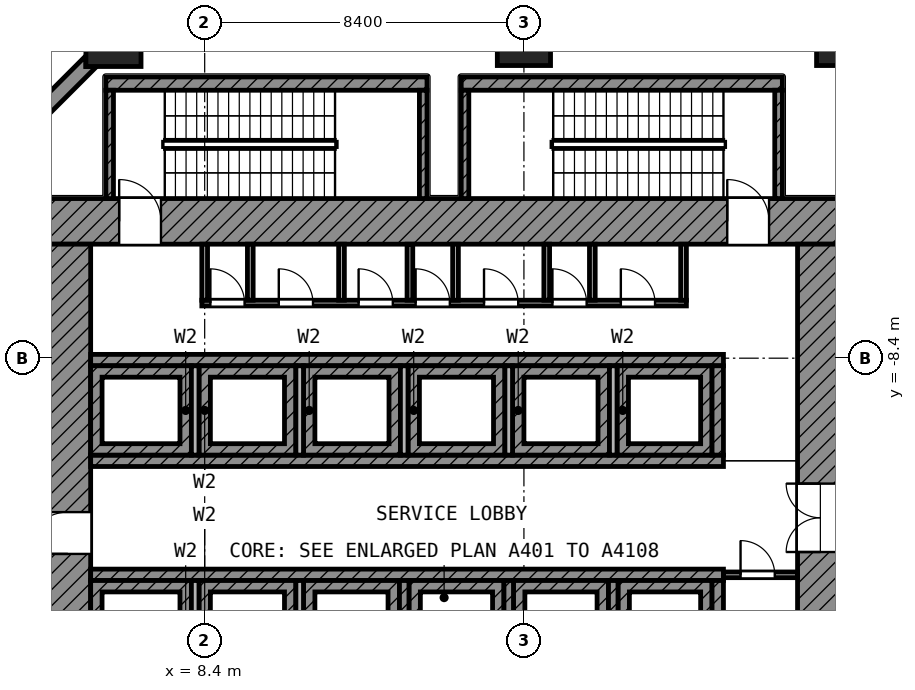
"""IFC4 building model, lengths in metres.
Left out: names, types, materials, properties, quantities, classifications, styles, units other than length and angle.
Written with IfcOpenShell. Run it as: python <this file> out.ifc"""

import sys

from ifc_helpers import new_model, si_unit, direction, frame, frame_2d, origin, origin_2d, place, context, subcontext, project, spatial, polyline, rectangle, outline, extrude, element, fill, save


model = new_model("IFC4")
c1 = context("Model", 3, precision=1e-05, world=origin(), true_north=direction((0.0, 1.0)))
c2 = subcontext(c1, "Body", "Model", "MODEL_VIEW")
j1 = project(units=[si_unit("LENGTHUNIT", "METRE"), si_unit("PLANEANGLEUNIT", "RADIAN")], contexts=[c1])
p1 = place(None, origin())
s1 = spatial("IfcSite", under=j1, at=p1, CompositionType="ELEMENT")
p2 = place(p1, origin())
s2 = spatial("IfcBuilding", under=s1, at=p2, CompositionType="ELEMENT")
p3 = place(p2, frame((0.0, 0.0, -6.0)))
s3 = spatial("IfcBuildingStorey", under=s2, at=p3, CompositionType="ELEMENT", Elevation=-6.0)
p4 = place(p3, origin())
e1 = element("IfcWall", 1, at=p4, inside=s3, PredefinedType="SOLIDWALL", context=c2, shape_type="SweptSolid", body=[
    extrude(outline(polyline([(5.275, -0.725), (5.558, -0.725), (0.725, -5.558), (0.725, -5.275), (0.442, -5.275), (5.275, -0.442), (5.275, -0.725)])), origin(), (0.0, 0.0, 1.0), 5.55),
])
e2 = element("IfcWall", 2, at=p4, inside=s3, PredefinedType="SHEAR", context=c2, shape_type="SweptSolid", body=[
    extrude(outline(polyline([(11.0, -16.6), (11.0, -14.25), (13.525, -14.25), (13.525, -16.6), (11.0, -16.6)]), holes=[polyline([(13.225, -14.55), (11.3, -14.55), (11.3, -16.3), (13.225, -16.3), (13.225, -14.55)])]), origin(), (0.0, 0.0, 1.0), 4.2),
])
e3 = element("IfcWall", 3, at=p4, inside=s3, PredefinedType="SHEAR", context=c2, shape_type="SweptSolid", body=[
    extrude(outline(polyline([(13.775, -16.6), (13.775, -14.25), (16.275, -14.25), (16.275, -16.6), (13.775, -16.6)]), holes=[polyline([(15.975, -14.55), (14.075, -14.55), (14.075, -16.3), (15.975, -16.3), (15.975, -14.55)])]), origin(), (0.0, 0.0, 1.0), 4.2),
])
e4 = element("IfcWall", 4, at=p4, inside=s3, PredefinedType="SHEAR", context=c2, shape_type="SweptSolid", body=[
    extrude(outline(polyline([(16.525, -16.6), (16.525, -14.25), (19.025, -14.25), (19.025, -16.6), (16.525, -16.6)]), holes=[polyline([(18.725, -14.55), (16.825, -14.55), (16.825, -16.3), (18.725, -16.3), (18.725, -14.55)])]), origin(), (0.0, 0.0, 1.0), 4.2),
])
e5 = element("IfcWall", 5, at=p4, inside=s3, PredefinedType="SHEAR", context=c2, shape_type="SweptSolid", body=[
    extrude(outline(polyline([(19.275, -16.6), (19.275, -14.25), (21.75, -14.25), (21.75, -16.6), (19.275, -16.6)]), holes=[polyline([(21.45, -14.55), (19.575, -14.55), (19.575, -16.3), (21.45, -16.3), (21.45, -14.55)])]), origin(), (0.0, 0.0, 1.0), 4.2),
])
e6 = element("IfcWall", 6, at=p4, inside=s3, PredefinedType="SHEAR", context=c2, shape_type="SweptSolid", body=[
    extrude(outline(polyline([(5.4, -10.95), (5.4, -8.6), (8.05, -8.6), (8.05, -10.95), (5.4, -10.95)]), holes=[polyline([(7.75, -8.9), (5.7, -8.9), (5.7, -10.65), (7.75, -10.65), (7.75, -8.9)])]), origin(), (0.0, 0.0, 1.0), 4.2),
])
e7 = element("IfcWall", 7, at=p4, inside=s3, PredefinedType="SHEAR", context=c2, shape_type="SweptSolid", body=[
    extrude(outline(polyline([(8.25, -10.95), (8.25, -8.6), (10.8, -8.6), (10.8, -10.95), (8.25, -10.95)]), holes=[polyline([(10.5, -8.9), (8.55, -8.9), (8.55, -10.65), (10.5, -10.65), (10.5, -8.9)])]), origin(), (0.0, 0.0, 1.0), 4.2),
])
e8 = element("IfcWall", 8, at=p4, inside=s3, PredefinedType="SHEAR", context=c2, shape_type="SweptSolid", body=[
    extrude(outline(polyline([(11.0, -10.95), (11.0, -8.6), (13.55, -8.6), (13.55, -10.95), (11.0, -10.95)]), holes=[polyline([(13.25, -8.9), (11.3, -8.9), (11.3, -10.65), (13.25, -10.65), (13.25, -8.9)])]), origin(), (0.0, 0.0, 1.0), 4.2),
])
e9 = element("IfcWall", 9, at=p4, inside=s3, PredefinedType="SHEAR", context=c2, shape_type="SweptSolid", body=[
    extrude(outline(polyline([(13.75, -10.95), (13.75, -8.6), (16.3, -8.6), (16.3, -10.95), (13.75, -10.95)]), holes=[polyline([(16.0, -8.9), (14.05, -8.9), (14.05, -10.65), (16.0, -10.65), (16.0, -8.9)])]), origin(), (0.0, 0.0, 1.0), 4.2),
])
e10 = element("IfcWall", 10, at=p4, inside=s3, PredefinedType="SHEAR", context=c2, shape_type="SweptSolid", body=[
    extrude(outline(polyline([(16.5, -10.95), (16.5, -8.6), (19.05, -8.6), (19.05, -10.95), (16.5, -10.95)]), holes=[polyline([(18.75, -8.9), (16.8, -8.9), (16.8, -10.65), (18.75, -10.65), (18.75, -8.9)])]), origin(), (0.0, 0.0, 1.0), 4.2),
])
e11 = element("IfcWall", 11, at=p4, inside=s3, PredefinedType="SHEAR", context=c2, shape_type="SweptSolid", body=[
    extrude(outline(polyline([(19.25, -10.95), (19.25, -8.6), (21.75, -8.6), (21.75, -10.95), (19.25, -10.95)]), holes=[polyline([(21.45, -8.9), (19.55, -8.9), (19.55, -10.65), (21.45, -10.65), (21.45, -8.9)])]), origin(), (0.0, 0.0, 1.0), 4.2),
])
e12 = element("IfcWall", 12, at=p4, inside=s3, PredefinedType="SHEAR", context=c2, shape_type="SweptSolid", body=[
    extrude(outline(polyline([(5.4, -16.6), (5.4, -14.25), (8.05, -14.25), (8.05, -16.6), (5.4, -16.6)]), holes=[polyline([(7.75, -14.55), (5.7, -14.55), (5.7, -16.3), (7.75, -16.3), (7.75, -14.55)])]), origin(), (0.0, 0.0, 1.0), 4.2),
])
e13 = element("IfcWall", 13, at=p4, inside=s3, PredefinedType="SHEAR", context=c2, shape_type="SweptSolid", body=[
    extrude(outline(polyline([(8.25, -16.6), (8.25, -14.25), (10.8, -14.25), (10.8, -16.6), (8.25, -16.6)]), holes=[polyline([(10.5, -14.55), (8.55, -14.55), (8.55, -16.3), (10.5, -16.3), (10.5, -14.55)])]), origin(), (0.0, 0.0, 1.0), 4.2),
])
p5 = place(p3, frame((6.0, 0.0, 0.0), z_axis=(0.0, 0.0, 1.0), x_axis=(1.0, 0.0, 0.0)))
e14 = element("IfcColumn", 14, at=p5, inside=s3, PredefinedType="COLUMN", context=c2, shape_type="SweptSolid", body=[
    extrude(rectangle(XDim=1.45, YDim=1.45, at=origin_2d()), origin(), (0.0, 0.0, 1.0), 6.0),
])
for number, where, z_axis, x_axis in (
    (15, (16.8, 0.0, 0.0), (0.0, 0.0, 1.0), (1.0, 0.0, 0.0)),
    (16, (25.2, 0.0, 0.0), (0.0, 0.0, 1.0), (1.0, 0.0, 0.0)),
):
    element("IfcColumn", number, at=place(p3, frame(where, z_axis=z_axis, x_axis=x_axis)), inside=s3, PredefinedType="COLUMN", context=c2, shape_type="SweptSolid", body=[
        extrude(rectangle(XDim=1.4, YDim=1.4, at=origin_2d()), origin(), (0.0, 0.0, 1.0), 6.0),
    ])
p6 = place(p3, frame((4.2, -4.8, 0.0), z_axis=(0.0, 0.0, 1.0), x_axis=(1.0, 0.0, 0.0)))
e17 = element("IfcWall", 17, at=p6, inside=s3, PredefinedType="SHEAR", context=c2, shape_type="SweptSolid", body=[
    extrude(rectangle(XDim=21.0, YDim=1.2, at=frame_2d((10.5, 0.0))), origin(), (0.0, 0.0, 1.0), 5.55),
])
p7 = place(p6, frame((1.95, 0.0, 0.0)))
e18 = element("IfcOpeningElement", 18, at=p7, cuts=e17, PredefinedType="OPENING", context=c2, shape_type="SweptSolid", body=[
    extrude(rectangle(XDim=1.1, YDim=2.1, at=frame_2d((0.55, 1.05))), frame((0.0, 0.61, 0.0), z_axis=(0.0, -1.0, 0.0), x_axis=(1.0, 0.0, 0.0)), (0.0, 0.0, 1.0), 1.22),
])
p8 = place(p6, frame((17.95, 0.0, 0.0)))
e19 = element("IfcOpeningElement", 19, at=p8, cuts=e17, PredefinedType="OPENING", context=c2, shape_type="SweptSolid", body=[
    extrude(rectangle(XDim=1.1, YDim=2.1, at=frame_2d((0.55, 1.05))), frame((0.0, 0.61, 0.0), z_axis=(0.0, -1.0, 0.0), x_axis=(1.0, 0.0, 0.0)), (0.0, 0.0, 1.0), 1.22),
])
p9 = place(p3, frame((4.8, -25.2, 0.0), z_axis=(0.0, 0.0, 1.0), x_axis=(0.0, 1.0, 0.0)))
e20 = element("IfcWall", 20, at=p9, inside=s3, PredefinedType="SHEAR", context=c2, shape_type="SweptSolid", body=[
    extrude(rectangle(XDim=19.8, YDim=1.2, at=frame_2d((9.9, 0.0))), origin(), (0.0, 0.0, 1.0), 5.55),
])
p10 = place(p9, frame((11.65, 0.0, 0.0)))
e21 = element("IfcOpeningElement", 21, at=p10, cuts=e20, PredefinedType="OPENING", context=c2, shape_type="SweptSolid", body=[
    extrude(rectangle(XDim=1.1, YDim=2.1, at=frame_2d((0.55, 1.05))), frame((0.0, 0.61, 0.0), z_axis=(0.0, -1.0, 0.0), x_axis=(1.0, 0.0, 0.0)), (0.0, 0.0, 1.0), 1.22),
])
p11 = place(p9, frame((2.35, 0.0, 0.0)))
e22 = element("IfcOpeningElement", 22, at=p11, cuts=e20, PredefinedType="OPENING", context=c2, shape_type="SweptSolid", body=[
    extrude(rectangle(XDim=1.1, YDim=2.1, at=frame_2d((0.55, 1.05))), frame((0.0, 0.61, 0.0), z_axis=(0.0, -1.0, 0.0), x_axis=(1.0, 0.0, 0.0)), (0.0, 0.0, 1.0), 1.22),
])
p12 = place(p3, frame((24.6, -24.0, 0.0), z_axis=(0.0, 0.0, 1.0), x_axis=(0.0, 1.0, 0.0)))
e23 = element("IfcWall", 23, at=p12, inside=s3, PredefinedType="SHEAR", context=c2, shape_type="SweptSolid", body=[
    extrude(rectangle(XDim=18.6, YDim=1.2, at=frame_2d((9.3, 0.0))), origin(), (0.0, 0.0, 1.0), 5.55),
])
p13 = place(p12, frame((10.5, 0.0, 0.0)))
e24 = element("IfcOpeningElement", 24, at=p13, cuts=e23, PredefinedType="OPENING", context=c2, shape_type="SweptSolid", body=[
    extrude(rectangle(XDim=1.8, YDim=2.1, at=frame_2d((0.9, 1.05))), frame((0.0, 0.61, 0.0), z_axis=(0.0, -1.0, 0.0), x_axis=(1.0, 0.0, 0.0)), (0.0, 0.0, 1.0), 1.22),
])
for number, where, z_axis, x_axis in (
    (25, (5.4, -8.45, 0.0), (0.0, 0.0, 1.0), (1.0, 0.0, 0.0)),
    (26, (5.4, -11.1, 0.0), (0.0, 0.0, 1.0), (1.0, 0.0, 0.0)),
    (27, (5.4, -14.1, 0.0), (0.0, 0.0, 1.0), (1.0, 0.0, 0.0)),
):
    element("IfcWall", number, at=place(p3, frame(where, z_axis=z_axis, x_axis=x_axis)), inside=s3, PredefinedType="SHEAR", context=c2, shape_type="SweptSolid", body=[
        extrude(rectangle(XDim=16.65, YDim=0.3, at=frame_2d((8.325, 0.0))), origin(), (0.0, 0.0, 1.0), 5.55),
    ])
p14 = place(p3, frame((21.9, -10.95, 0.0), z_axis=(0.0, 0.0, 1.0), x_axis=(0.0, 1.0, 0.0)))
e28 = element("IfcWall", 28, at=p14, inside=s3, PredefinedType="SHEAR", context=c2, shape_type="SweptSolid", body=[
    extrude(rectangle(XDim=2.35, YDim=0.3, at=frame_2d((1.175, 0.0))), origin(), (0.0, 0.0, 1.0), 5.55),
])
p15 = place(p3, frame((21.9, -16.6, 0.0), z_axis=(0.0, 0.0, 1.0), x_axis=(0.0, 1.0, 0.0)))
e29 = element("IfcWall", 29, at=p15, inside=s3, PredefinedType="SHEAR", context=c2, shape_type="SweptSolid", body=[
    extrude(rectangle(XDim=2.35, YDim=0.3, at=frame_2d((1.175, 0.0))), origin(), (0.0, 0.0, 1.0), 5.55),
])
for number, where, z_axis, x_axis in (
    (30, (8.15, -10.95, 0.0), (0.0, 0.0, 1.0), (0.0, 1.0, 0.0)),
    (31, (10.9, -10.95, 0.0), (0.0, 0.0, 1.0), (0.0, 1.0, 0.0)),
    (32, (13.65, -10.95, 0.0), (0.0, 0.0, 1.0), (0.0, 1.0, 0.0)),
    (33, (16.4, -10.95, 0.0), (0.0, 0.0, 1.0), (0.0, 1.0, 0.0)),
    (34, (19.15, -10.95, 0.0), (0.0, 0.0, 1.0), (0.0, 1.0, 0.0)),
):
    element("IfcWall", number, at=place(p3, frame(where, z_axis=z_axis, x_axis=x_axis)), inside=s3, PredefinedType="PARTITIONING", context=c2, shape_type="SweptSolid", body=[
        extrude(rectangle(XDim=2.35, YDim=0.2, at=frame_2d((1.175, 0.0))), origin(), (0.0, 0.0, 1.0), 5.55),
    ])
for number, where, z_axis, x_axis in (
    (35, (8.15, -16.6, 0.0), (0.0, 0.0, 1.0), (0.0, 1.0, 0.0)),
    (36, (10.9, -16.6, 0.0), (0.0, 0.0, 1.0), (0.0, 1.0, 0.0)),
):
    element("IfcWall", number, at=place(p3, frame(where, z_axis=z_axis, x_axis=x_axis)), inside=s3, PredefinedType="PARTITIONING", context=c2, shape_type="SweptSolid", body=[
        extrude(rectangle(XDim=2.35, YDim=0.2, at=frame_2d((1.175, 0.0))), origin(), (0.0, 0.0, 1.0), 5.55),
    ])
for number, where, z_axis, x_axis in (
    (37, (13.65, -16.6, 0.0), (0.0, 0.0, 1.0), (0.0, 1.0, 0.0)),
    (38, (16.4, -16.6, 0.0), (0.0, 0.0, 1.0), (0.0, 1.0, 0.0)),
    (39, (19.15, -16.6, 0.0), (0.0, 0.0, 1.0), (0.0, 1.0, 0.0)),
):
    element("IfcWall", number, at=place(p3, frame(where, z_axis=z_axis, x_axis=x_axis)), inside=s3, PredefinedType="SHEAR", context=c2, shape_type="SweptSolid", body=[
        extrude(rectangle(XDim=2.35, YDim=0.25, at=frame_2d((1.175, 0.0))), origin(), (0.0, 0.0, 1.0), 5.55),
    ])
p16 = place(p3, frame((22.05, -14.1, 0.0), z_axis=(0.0, 0.0, 1.0), x_axis=(1.0, 0.0, 0.0)))
e40 = element("IfcWall", 40, at=p16, inside=s3, PredefinedType="PARTITIONING", context=c2, shape_type="SweptSolid", body=[
    extrude(rectangle(XDim=1.95, YDim=0.15, at=frame_2d((0.975, 0.0))), origin(), (0.0, 0.0, 1.0), 5.55),
])
p17 = place(p16, frame((0.45, 0.0, 0.0)))
e41 = element("IfcOpeningElement", 41, at=p17, cuts=e40, PredefinedType="OPENING", context=c2, shape_type="SweptSolid", body=[
    extrude(rectangle(XDim=0.9, YDim=2.1, at=frame_2d((0.45, 1.05))), frame((0.0, 0.085, 0.0), z_axis=(0.0, -1.0, 0.0), x_axis=(1.0, 0.0, 0.0)), (0.0, 0.0, 1.0), 0.17),
])
p18 = place(p3, frame((8.325, -6.95, 0.0), z_axis=(0.0, 0.0, 1.0), x_axis=(1.0, 0.0, 0.0)))
e42 = element("IfcWall", 42, at=p18, inside=s3, PredefinedType="PARTITIONING", context=c2, shape_type="SweptSolid", body=[
    extrude(rectangle(XDim=12.75, YDim=0.15, at=frame_2d((6.375, 0.0))), origin(), (0.0, 0.0, 1.0), 5.55),
])
p19 = place(p18, frame((0.225, 0.0, 0.0)))
e43 = element("IfcOpeningElement", 43, at=p19, cuts=e42, PredefinedType="OPENING", context=c2, shape_type="SweptSolid", body=[
    extrude(rectangle(XDim=0.9, YDim=2.1, at=frame_2d((0.45, 1.05))), frame((0.0, 0.085, 0.0), z_axis=(0.0, -1.0, 0.0), x_axis=(1.0, 0.0, 0.0)), (0.0, 0.0, 1.0), 0.17),
])
p20 = place(p18, frame((2.025, 0.0, 0.0)))
e44 = element("IfcOpeningElement", 44, at=p20, cuts=e42, PredefinedType="OPENING", context=c2, shape_type="SweptSolid", body=[
    extrude(rectangle(XDim=0.9, YDim=2.1, at=frame_2d((0.45, 1.05))), frame((0.0, 0.085, 0.0), z_axis=(0.0, -1.0, 0.0), x_axis=(1.0, 0.0, 0.0)), (0.0, 0.0, 1.0), 0.17),
])
p21 = place(p18, frame((4.125, 0.0, 0.0)))
e45 = element("IfcOpeningElement", 45, at=p21, cuts=e42, PredefinedType="OPENING", context=c2, shape_type="SweptSolid", body=[
    extrude(rectangle(XDim=0.9, YDim=2.1, at=frame_2d((0.45, 1.05))), frame((0.0, 0.085, 0.0), z_axis=(0.0, -1.0, 0.0), x_axis=(1.0, 0.0, 0.0)), (0.0, 0.0, 1.0), 0.17),
])
p22 = place(p18, frame((5.625, 0.0, 0.0)))
e46 = element("IfcOpeningElement", 46, at=p22, cuts=e42, PredefinedType="OPENING", context=c2, shape_type="SweptSolid", body=[
    extrude(rectangle(XDim=0.9, YDim=2.1, at=frame_2d((0.45, 1.05))), frame((0.0, 0.085, 0.0), z_axis=(0.0, -1.0, 0.0), x_axis=(1.0, 0.0, 0.0)), (0.0, 0.0, 1.0), 0.17),
])
p23 = place(p18, frame((7.425, 0.0, 0.0)))
e47 = element("IfcOpeningElement", 47, at=p23, cuts=e42, PredefinedType="OPENING", context=c2, shape_type="SweptSolid", body=[
    extrude(rectangle(XDim=0.9, YDim=2.1, at=frame_2d((0.45, 1.05))), frame((0.0, 0.085, 0.0), z_axis=(0.0, -1.0, 0.0), x_axis=(1.0, 0.0, 0.0)), (0.0, 0.0, 1.0), 0.17),
])
p24 = place(p18, frame((9.225, 0.0, 0.0)))
e48 = element("IfcOpeningElement", 48, at=p24, cuts=e42, PredefinedType="OPENING", context=c2, shape_type="SweptSolid", body=[
    extrude(rectangle(XDim=0.9, YDim=2.1, at=frame_2d((0.45, 1.05))), frame((0.0, 0.085, 0.0), z_axis=(0.0, -1.0, 0.0), x_axis=(1.0, 0.0, 0.0)), (0.0, 0.0, 1.0), 0.17),
])
p25 = place(p18, frame((11.025, 0.0, 0.0)))
e49 = element("IfcOpeningElement", 49, at=p25, cuts=e42, PredefinedType="OPENING", context=c2, shape_type="SweptSolid", body=[
    extrude(rectangle(XDim=0.9, YDim=2.1, at=frame_2d((0.45, 1.05))), frame((0.0, 0.085, 0.0), z_axis=(0.0, -1.0, 0.0), x_axis=(1.0, 0.0, 0.0)), (0.0, 0.0, 1.0), 0.17),
])
for number, where, z_axis, x_axis in (
    (50, (8.4, -6.875, 0.0), (0.0, 0.0, 1.0), (0.0, 1.0, 0.0)),
    (51, (9.6, -6.875, 0.0), (0.0, 0.0, 1.0), (0.0, 1.0, 0.0)),
    (52, (12.0, -6.875, 0.0), (0.0, 0.0, 1.0), (0.0, 1.0, 0.0)),
    (53, (13.8, -6.875, 0.0), (0.0, 0.0, 1.0), (0.0, 1.0, 0.0)),
    (54, (15.0, -6.875, 0.0), (0.0, 0.0, 1.0), (0.0, 1.0, 0.0)),
    (55, (17.4, -6.875, 0.0), (0.0, 0.0, 1.0), (0.0, 1.0, 0.0)),
    (56, (18.6, -6.875, 0.0), (0.0, 0.0, 1.0), (0.0, 1.0, 0.0)),
    (57, (21.0, -6.875, 0.0), (0.0, 0.0, 1.0), (0.0, 1.0, 0.0)),
):
    element("IfcWall", number, at=place(p3, frame(where, z_axis=z_axis, x_axis=x_axis)), inside=s3, PredefinedType="PARTITIONING", context=c2, shape_type="SweptSolid", body=[
        extrude(rectangle(XDim=1.475, YDim=0.15, at=frame_2d((0.738, 0.0))), origin(), (0.0, 0.0, 1.0), 5.55),
    ])
p26 = place(p3, frame((5.8, -1.175, 0.0), z_axis=(0.0, 0.0, 1.0), x_axis=(1.0, 0.0, 0.0)))
e58 = element("IfcWall", 58, at=p26, inside=s3, PredefinedType="SHEAR", context=c2, shape_type="SweptSolid", body=[
    extrude(rectangle(XDim=8.45, YDim=0.35, at=frame_2d((4.225, 0.0))), origin(), (0.0, 0.0, 1.0), 5.55),
])
for number, where, z_axis, x_axis in (
    (59, (5.9, -4.2, 0.0), (0.0, 0.0, 1.0), (0.0, 1.0, 0.0)),
    (60, (14.15, -4.2, 0.0), (0.0, 0.0, 1.0), (0.0, 1.0, 0.0)),
):
    element("IfcWall", number, at=place(p3, frame(where, z_axis=z_axis, x_axis=x_axis)), inside=s3, PredefinedType="SHEAR", context=c2, shape_type="SweptSolid", body=[
        extrude(rectangle(XDim=2.85, YDim=0.2, at=frame_2d((1.425, 0.0))), origin(), (0.0, 0.0, 1.0), 5.55),
    ])
p27 = place(p3, frame((15.15, -1.175, 0.0), z_axis=(0.0, 0.0, 1.0), x_axis=(1.0, 0.0, 0.0)))
e61 = element("IfcWall", 61, at=p27, inside=s3, PredefinedType="SHEAR", context=c2, shape_type="SweptSolid", body=[
    extrude(rectangle(XDim=8.45, YDim=0.35, at=frame_2d((4.225, 0.0))), origin(), (0.0, 0.0, 1.0), 5.55),
])
for number, where, z_axis, x_axis in (
    (62, (15.25, -4.2, 0.0), (0.0, 0.0, 1.0), (0.0, 1.0, 0.0)),
    (63, (23.5, -4.2, 0.0), (0.0, 0.0, 1.0), (0.0, 1.0, 0.0)),
):
    element("IfcWall", number, at=place(p3, frame(where, z_axis=z_axis, x_axis=x_axis)), inside=s3, PredefinedType="SHEAR", context=c2, shape_type="SweptSolid", body=[
        extrude(rectangle(XDim=2.85, YDim=0.2, at=frame_2d((1.425, 0.0))), origin(), (0.0, 0.0, 1.0), 5.55),
    ])
p28 = place(p10, origin())
e64 = element("IfcDoor", 64, at=p28, inside=s3, OperationType="SINGLE_SWING_LEFT", PredefinedType="DOOR", context=c2, shape_type="SweptSolid", body=[
    extrude(rectangle(XDim=1.1, YDim=2.1, at=frame_2d((0.55, 1.05))), frame((0.0, 0.025, 0.0), z_axis=(0.0, -1.0, 0.0), x_axis=(1.0, 0.0, 0.0)), (0.0, 0.0, 1.0), 0.05),
])
fill(e21, e64)
p29 = place(p7, origin())
e65 = element("IfcDoor", 65, at=p29, inside=s3, OperationType="SINGLE_SWING_LEFT", PredefinedType="DOOR", context=c2, shape_type="SweptSolid", body=[
    extrude(rectangle(XDim=1.1, YDim=2.1, at=frame_2d((0.55, 1.05))), frame((0.0, 0.025, 0.0), z_axis=(0.0, -1.0, 0.0), x_axis=(1.0, 0.0, 0.0)), (0.0, 0.0, 1.0), 0.05),
])
fill(e18, e65)
p30 = place(p8, origin())
e66 = element("IfcDoor", 66, at=p30, inside=s3, OperationType="SINGLE_SWING_LEFT", PredefinedType="DOOR", context=c2, shape_type="SweptSolid", body=[
    extrude(rectangle(XDim=1.1, YDim=2.1, at=frame_2d((0.55, 1.05))), frame((0.0, 0.025, 0.0), z_axis=(0.0, -1.0, 0.0), x_axis=(1.0, 0.0, 0.0)), (0.0, 0.0, 1.0), 0.05),
])
fill(e19, e66)
p31 = place(p13, origin())
e67 = element("IfcDoor", 67, at=p31, inside=s3, OperationType="DOUBLE_DOOR_SINGLE_SWING", PredefinedType="DOOR", context=c2, shape_type="SweptSolid", body=[
    extrude(rectangle(XDim=1.8, YDim=2.1, at=frame_2d((0.9, 1.05))), frame((0.0, 0.025, 0.0), z_axis=(0.0, -1.0, 0.0), x_axis=(1.0, 0.0, 0.0)), (0.0, 0.0, 1.0), 0.05),
])
fill(e24, e67)
p32 = place(p19, origin())
e68 = element("IfcDoor", 68, at=p32, inside=s3, OperationType="SINGLE_SWING_LEFT", PredefinedType="DOOR", context=c2, shape_type="SweptSolid", body=[
    extrude(rectangle(XDim=0.9, YDim=2.1, at=frame_2d((0.45, 1.05))), frame((0.0, 0.025, 0.0), z_axis=(0.0, -1.0, 0.0), x_axis=(1.0, 0.0, 0.0)), (0.0, 0.0, 1.0), 0.05),
])
fill(e43, e68)
p33 = place(p20, origin())
e69 = element("IfcDoor", 69, at=p33, inside=s3, OperationType="SINGLE_SWING_LEFT", PredefinedType="DOOR", context=c2, shape_type="SweptSolid", body=[
    extrude(rectangle(XDim=0.9, YDim=2.1, at=frame_2d((0.45, 1.05))), frame((0.0, 0.025, 0.0), z_axis=(0.0, -1.0, 0.0), x_axis=(1.0, 0.0, 0.0)), (0.0, 0.0, 1.0), 0.05),
])
fill(e44, e69)
p34 = place(p21, origin())
e70 = element("IfcDoor", 70, at=p34, inside=s3, OperationType="SINGLE_SWING_LEFT", PredefinedType="DOOR", context=c2, shape_type="SweptSolid", body=[
    extrude(rectangle(XDim=0.9, YDim=2.1, at=frame_2d((0.45, 1.05))), frame((0.0, 0.025, 0.0), z_axis=(0.0, -1.0, 0.0), x_axis=(1.0, 0.0, 0.0)), (0.0, 0.0, 1.0), 0.05),
])
fill(e45, e70)
p35 = place(p22, origin())
e71 = element("IfcDoor", 71, at=p35, inside=s3, OperationType="SINGLE_SWING_LEFT", PredefinedType="DOOR", context=c2, shape_type="SweptSolid", body=[
    extrude(rectangle(XDim=0.9, YDim=2.1, at=frame_2d((0.45, 1.05))), frame((0.0, 0.025, 0.0), z_axis=(0.0, -1.0, 0.0), x_axis=(1.0, 0.0, 0.0)), (0.0, 0.0, 1.0), 0.05),
])
fill(e46, e71)
p36 = place(p23, origin())
e72 = element("IfcDoor", 72, at=p36, inside=s3, OperationType="SINGLE_SWING_LEFT", PredefinedType="DOOR", context=c2, shape_type="SweptSolid", body=[
    extrude(rectangle(XDim=0.9, YDim=2.1, at=frame_2d((0.45, 1.05))), frame((0.0, 0.025, 0.0), z_axis=(0.0, -1.0, 0.0), x_axis=(1.0, 0.0, 0.0)), (0.0, 0.0, 1.0), 0.05),
])
fill(e47, e72)
p37 = place(p24, origin())
e73 = element("IfcDoor", 73, at=p37, inside=s3, OperationType="SINGLE_SWING_LEFT", PredefinedType="DOOR", context=c2, shape_type="SweptSolid", body=[
    extrude(rectangle(XDim=0.9, YDim=2.1, at=frame_2d((0.45, 1.05))), frame((0.0, 0.025, 0.0), z_axis=(0.0, -1.0, 0.0), x_axis=(1.0, 0.0, 0.0)), (0.0, 0.0, 1.0), 0.05),
])
fill(e48, e73)
p38 = place(p25, origin())
e74 = element("IfcDoor", 74, at=p38, inside=s3, OperationType="SINGLE_SWING_LEFT", PredefinedType="DOOR", context=c2, shape_type="SweptSolid", body=[
    extrude(rectangle(XDim=0.9, YDim=2.1, at=frame_2d((0.45, 1.05))), frame((0.0, 0.025, 0.0), z_axis=(0.0, -1.0, 0.0), x_axis=(1.0, 0.0, 0.0)), (0.0, 0.0, 1.0), 0.05),
])
fill(e49, e74)
p39 = place(p17, origin())
e75 = element("IfcDoor", 75, at=p39, inside=s3, OperationType="SINGLE_SWING_LEFT", PredefinedType="DOOR", context=c2, shape_type="SweptSolid", body=[
    extrude(rectangle(XDim=0.9, YDim=2.1, at=frame_2d((0.45, 1.05))), frame((0.0, 0.025, 0.0), z_axis=(0.0, -1.0, 0.0), x_axis=(1.0, 0.0, 0.0)), (0.0, 0.0, 1.0), 0.05),
])
fill(e41, e75)
save(model, sys.argv[1])
